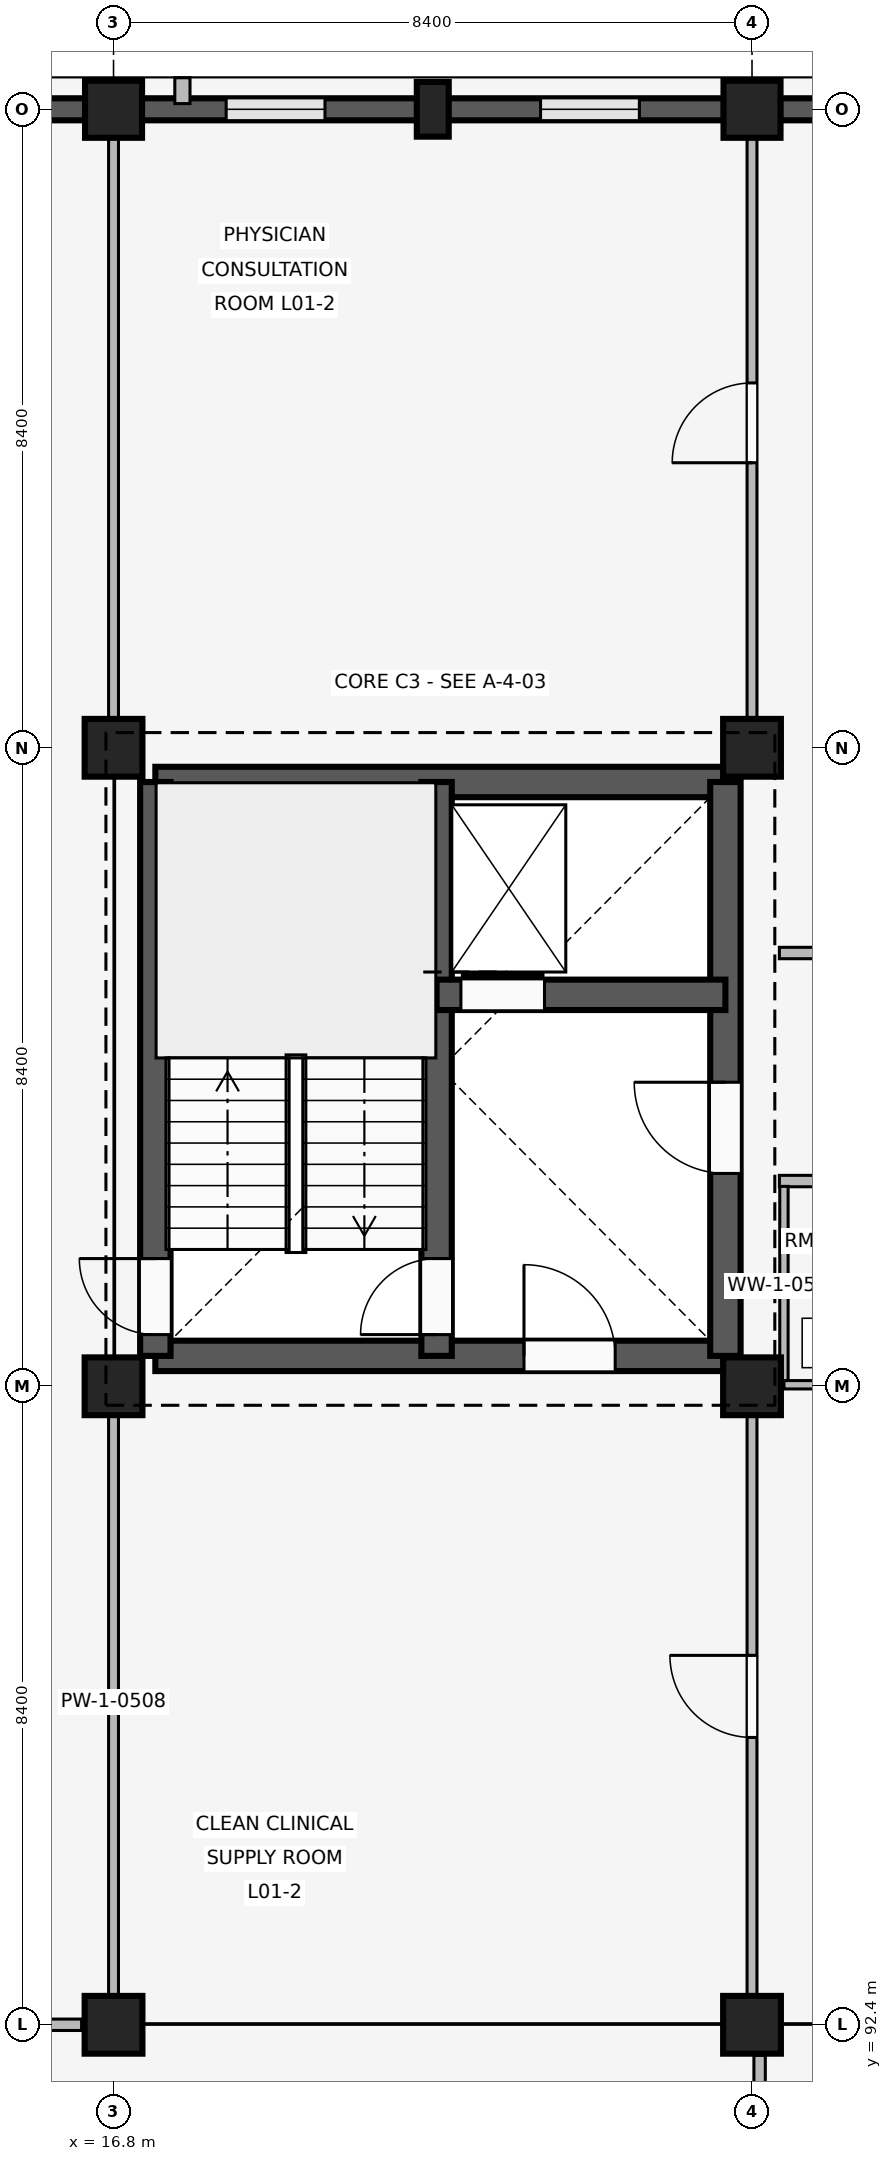
"""IFC4 building model, lengths in metres.
Left out: names, types, materials, properties, quantities, classifications, styles, units other than length and angle.
Written with IfcOpenShell. Run it as: python <this file> out.ifc"""

import sys

from ifc_helpers import new_model, si_unit, direction, frame, frame_2d, origin, origin_2d, place, context, subcontext, project, spatial, rectangle, extrude, element, fill, save


model = new_model("IFC4")
c1 = context("Model", 3, precision=1e-05, world=origin(), true_north=direction((0.0, 1.0)))
c2 = subcontext(c1, "Body", "Model", "MODEL_VIEW")
j1 = project(units=[si_unit("LENGTHUNIT", "METRE"), si_unit("PLANEANGLEUNIT", "RADIAN")], contexts=[c1])
p1 = place(None, origin())
s1 = spatial("IfcSite", under=j1, at=p1, CompositionType="ELEMENT")
p2 = place(p1, origin())
s2 = spatial("IfcBuilding", under=s1, at=p2, CompositionType="ELEMENT")
p3 = place(p2, frame((0.0, 0.0, 4.8)))
s3 = spatial("IfcBuildingStorey", under=s2, at=p3, CompositionType="ELEMENT", Elevation=4.8)
for number, where, z_axis, x_axis in (
    (1, (16.8, 92.4, 0.0), (0.0, 0.0, 1.0), (1.0, 0.0, 0.0)),
    (2, (16.8, 100.8, 0.0), (0.0, 0.0, 1.0), (1.0, 0.0, 0.0)),
    (3, (16.8, 109.2, 0.0), (0.0, 0.0, 1.0), (1.0, 0.0, 0.0)),
):
    element("IfcColumn", number, at=place(p3, frame(where, z_axis=z_axis, x_axis=x_axis)), inside=s3, PredefinedType="COLUMN", context=c2, shape_type="SweptSolid", body=[
        extrude(rectangle(XDim=0.76, YDim=0.76, at=origin_2d()), origin(), (0.0, 0.0, 1.0), 3.3),
    ])
p4 = place(p3, frame((16.8, 117.6, 0.0), z_axis=(0.0, 0.0, 1.0), x_axis=(1.0, 0.0, 0.0)))
e4 = element("IfcColumn", 4, at=p4, inside=s3, PredefinedType="COLUMN", context=c2, shape_type="SweptSolid", body=[
    extrude(rectangle(XDim=0.75, YDim=0.75, at=origin_2d()), origin(), (0.0, 0.0, 1.0), 3.3),
])
for number, where, z_axis, x_axis in (
    (5, (25.2, 92.4, 0.0), (0.0, 0.0, 1.0), (1.0, 0.0, 0.0)),
    (6, (25.2, 100.8, 0.0), (0.0, 0.0, 1.0), (1.0, 0.0, 0.0)),
    (7, (25.2, 109.2, 0.0), (0.0, 0.0, 1.0), (1.0, 0.0, 0.0)),
):
    element("IfcColumn", number, at=place(p3, frame(where, z_axis=z_axis, x_axis=x_axis)), inside=s3, PredefinedType="COLUMN", context=c2, shape_type="SweptSolid", body=[
        extrude(rectangle(XDim=0.76, YDim=0.76, at=origin_2d()), origin(), (0.0, 0.0, 1.0), 3.3),
    ])
p5 = place(p3, frame((25.2, 117.6, 0.0), z_axis=(0.0, 0.0, 1.0), x_axis=(1.0, 0.0, 0.0)))
e8 = element("IfcColumn", 8, at=p5, inside=s3, PredefinedType="COLUMN", context=c2, shape_type="SweptSolid", body=[
    extrude(rectangle(XDim=0.75, YDim=0.75, at=origin_2d()), origin(), (0.0, 0.0, 1.0), 3.3),
])
p6 = place(p3, frame((21.0, 117.6, 0.0), z_axis=(0.0, 0.0, 1.0), x_axis=(1.0, 0.0, 0.0)))
e9 = element("IfcColumn", 9, at=p6, inside=s3, PredefinedType="PILASTER", context=c2, shape_type="SweptSolid", body=[
    extrude(rectangle(XDim=0.42, YDim=0.72, at=origin_2d()), origin(), (0.0, 0.0, 1.0), 3.3),
])
p7 = place(p3, frame((8.77, 117.6, 0.0), z_axis=(0.0, 0.0, 1.0), x_axis=(1.0, 0.0, 0.0)))
e10 = element("IfcWall", 10, at=p7, inside=s3, PredefinedType="SOLIDWALL", context=c2, shape_type="SweptSolid", body=[
    extrude(rectangle(XDim=7.66, YDim=0.29, at=frame_2d((3.83, 0.0))), origin(), (0.0, 0.0, 1.0), 2.42),
])
p8 = place(p7, frame((1.088, 0.0, 1.05)))
e11 = element("IfcOpeningElement", 11, at=p8, cuts=e10, PredefinedType="OPENING", context=c2, shape_type="SweptSolid", body=[
    extrude(rectangle(XDim=1.5, YDim=0.75, at=frame_2d((0.75, 0.375))), frame((0.0, 0.155, 0.0), z_axis=(0.0, -1.0, 0.0), x_axis=(1.0, 0.0, 0.0)), (0.0, 0.0, 1.0), 0.31),
])
p9 = place(p7, frame((5.072, 0.0, 1.05)))
e12 = element("IfcOpeningElement", 12, at=p9, cuts=e10, PredefinedType="OPENING", context=c2, shape_type="SweptSolid", body=[
    extrude(rectangle(XDim=1.5, YDim=0.75, at=frame_2d((0.75, 0.375))), frame((0.0, 0.155, 0.0), z_axis=(0.0, -1.0, 0.0), x_axis=(1.0, 0.0, 0.0)), (0.0, 0.0, 1.0), 0.31),
])
p10 = place(p3, frame((17.17, 117.6, 0.0), z_axis=(0.0, 0.0, 1.0), x_axis=(1.0, 0.0, 0.0)))
e13 = element("IfcWall", 13, at=p10, inside=s3, PredefinedType="SOLIDWALL", context=c2, shape_type="SweptSolid", body=[
    extrude(rectangle(XDim=7.66, YDim=0.29, at=frame_2d((3.83, 0.0))), origin(), (0.0, 0.0, 1.0), 2.42),
])
p11 = place(p10, frame((1.112, 0.0, 1.05)))
e14 = element("IfcOpeningElement", 14, at=p11, cuts=e13, PredefinedType="OPENING", context=c2, shape_type="SweptSolid", body=[
    extrude(rectangle(XDim=1.3, YDim=0.75, at=frame_2d((0.65, 0.375))), frame((0.0, 0.155, 0.0), z_axis=(0.0, -1.0, 0.0), x_axis=(1.0, 0.0, 0.0)), (0.0, 0.0, 1.0), 0.31),
])
p12 = place(p10, frame((5.248, 0.0, 1.05)))
e15 = element("IfcOpeningElement", 15, at=p12, cuts=e13, PredefinedType="OPENING", context=c2, shape_type="SweptSolid", body=[
    extrude(rectangle(XDim=1.3, YDim=0.75, at=frame_2d((0.65, 0.375))), frame((0.0, 0.155, 0.0), z_axis=(0.0, -1.0, 0.0), x_axis=(1.0, 0.0, 0.0)), (0.0, 0.0, 1.0), 0.31),
])
p13 = place(p3, frame((17.706, 117.675, 0.0), z_axis=(0.0, 0.0, 1.0), x_axis=(0.0, 1.0, 0.0)))
e16 = element("IfcWall", 16, at=p13, inside=s3, PredefinedType="ELEMENTEDWALL", context=c2, shape_type="SweptSolid", body=[
    extrude(rectangle(XDim=0.34, YDim=0.2, at=frame_2d((0.17, 0.0))), origin(), (0.0, 0.0, 1.0), 2.4),
])
p14 = place(p3, frame((25.57, 117.6, 0.0), z_axis=(0.0, 0.0, 1.0), x_axis=(1.0, 0.0, 0.0)))
e17 = element("IfcWall", 17, at=p14, inside=s3, PredefinedType="SOLIDWALL", context=c2, shape_type="SweptSolid", body=[
    extrude(rectangle(XDim=7.66, YDim=0.29, at=frame_2d((3.83, 0.0))), origin(), (0.0, 0.0, 1.0), 2.42),
])
p15 = place(p14, frame((1.088, 0.0, 1.05)))
e18 = element("IfcOpeningElement", 18, at=p15, cuts=e17, PredefinedType="OPENING", context=c2, shape_type="SweptSolid", body=[
    extrude(rectangle(XDim=1.5, YDim=0.75, at=frame_2d((0.75, 0.375))), frame((0.0, 0.155, 0.0), z_axis=(0.0, -1.0, 0.0), x_axis=(1.0, 0.0, 0.0)), (0.0, 0.0, 1.0), 0.31),
])
p16 = place(p14, frame((5.072, 0.0, 1.05)))
e19 = element("IfcOpeningElement", 19, at=p16, cuts=e17, PredefinedType="OPENING", context=c2, shape_type="SweptSolid", body=[
    extrude(rectangle(XDim=1.5, YDim=0.75, at=frame_2d((0.75, 0.375))), frame((0.0, 0.155, 0.0), z_axis=(0.0, -1.0, 0.0), x_axis=(1.0, 0.0, 0.0)), (0.0, 0.0, 1.0), 0.31),
])
p17 = place(p3, frame((17.35, 101.2, 0.0), z_axis=(0.0, 0.0, 1.0), x_axis=(1.0, 0.0, 0.0)))
e20 = element("IfcWall", 20, at=p17, inside=s3, PredefinedType="SHEAR", context=c2, shape_type="SweptSolid", body=[
    extrude(rectangle(XDim=7.5, YDim=0.4, at=frame_2d((3.75, 0.0))), origin(), (0.0, 0.0, 1.0), 3.02),
])
p18 = place(p17, frame((4.85, 0.0, 0.0)))
e21 = element("IfcOpeningElement", 21, at=p18, cuts=e20, PredefinedType="OPENING", context=c2, shape_type="SweptSolid", body=[
    extrude(rectangle(XDim=1.2, YDim=2.1, at=frame_2d((0.6, 1.05))), frame((0.0, 0.21, 0.0), z_axis=(0.0, -1.0, 0.0), x_axis=(1.0, 0.0, 0.0)), (0.0, 0.0, 1.0), 0.42),
])
p19 = place(p3, frame((17.35, 108.75, 0.0), z_axis=(0.0, 0.0, 1.0), x_axis=(1.0, 0.0, 0.0)))
e22 = element("IfcWall", 22, at=p19, inside=s3, PredefinedType="SHEAR", context=c2, shape_type="SweptSolid", body=[
    extrude(rectangle(XDim=7.5, YDim=0.4, at=frame_2d((3.75, 0.0))), origin(), (0.0, 0.0, 1.0), 3.02),
])
p20 = place(p3, frame((17.35, 101.2, 0.0), z_axis=(0.0, 0.0, 1.0), x_axis=(0.0, 1.0, 0.0)))
e23 = element("IfcWall", 23, at=p20, inside=s3, PredefinedType="SHEAR", context=c2, shape_type="SweptSolid", body=[
    extrude(rectangle(XDim=7.55, YDim=0.4, at=frame_2d((3.775, 0.0))), origin(), (0.0, 0.0, 1.0), 3.02),
])
p21 = place(p20, frame((0.28, 0.0, 0.0)))
e24 = element("IfcOpeningElement", 24, at=p21, cuts=e23, PredefinedType="OPENING", context=c2, shape_type="SweptSolid", body=[
    extrude(rectangle(XDim=1.0, YDim=2.15, at=frame_2d((0.5, 1.075))), frame((0.0, 0.21, 0.0), z_axis=(0.0, -1.0, 0.0), x_axis=(1.0, 0.0, 0.0)), (0.0, 0.0, 1.0), 0.42),
])
p22 = place(p3, frame((24.85, 101.2, 0.0), z_axis=(0.0, 0.0, 1.0), x_axis=(0.0, 1.0, 0.0)))
e25 = element("IfcWall", 25, at=p22, inside=s3, PredefinedType="SHEAR", context=c2, shape_type="SweptSolid", body=[
    extrude(rectangle(XDim=7.55, YDim=0.4, at=frame_2d((3.775, 0.0))), origin(), (0.0, 0.0, 1.0), 3.02),
])
p23 = place(p22, frame((2.4, 0.0, 0.0)))
e26 = element("IfcOpeningElement", 26, at=p23, cuts=e25, PredefinedType="OPENING", context=c2, shape_type="SweptSolid", body=[
    extrude(rectangle(XDim=1.2, YDim=2.2, at=frame_2d((0.6, 1.1))), frame((0.0, 0.21, 0.0), z_axis=(0.0, -1.0, 0.0), x_axis=(1.0, 0.0, 0.0)), (0.0, 0.0, 1.0), 0.42),
])
p24 = place(p3, frame((21.05, 101.2, 0.0), z_axis=(0.0, 0.0, 1.0), x_axis=(0.0, 1.0, 0.0)))
e27 = element("IfcWall", 27, at=p24, inside=s3, PredefinedType="SHEAR", context=c2, shape_type="SweptSolid", body=[
    extrude(rectangle(XDim=7.55, YDim=0.4, at=frame_2d((3.775, 0.0))), origin(), (0.0, 0.0, 1.0), 3.02),
])
p25 = place(p24, frame((0.28, 0.0, 0.0)))
e28 = element("IfcOpeningElement", 28, at=p25, cuts=e27, PredefinedType="OPENING", context=c2, shape_type="SweptSolid", body=[
    extrude(rectangle(XDim=1.0, YDim=2.15, at=frame_2d((0.5, 1.075))), frame((0.0, 0.21, 0.0), z_axis=(0.0, -1.0, 0.0), x_axis=(1.0, 0.0, 0.0)), (0.0, 0.0, 1.0), 0.42),
])
p26 = place(p3, frame((21.05, 105.95, 0.0), z_axis=(0.0, 0.0, 1.0), x_axis=(1.0, 0.0, 0.0)))
e29 = element("IfcWall", 29, at=p26, inside=s3, PredefinedType="SHEAR", context=c2, shape_type="SweptSolid", body=[
    extrude(rectangle(XDim=3.8, YDim=0.4, at=frame_2d((1.9, 0.0))), origin(), (0.0, 0.0, 1.0), 3.02),
])
p27 = place(p26, frame((0.32, 0.0, 0.0)))
e30 = element("IfcOpeningElement", 30, at=p27, cuts=e29, PredefinedType="OPENING", context=c2, shape_type="SweptSolid", body=[
    extrude(rectangle(XDim=1.1, YDim=2.15, at=frame_2d((0.55, 1.075))), frame((0.0, 0.21, 0.0), z_axis=(0.0, -1.0, 0.0), x_axis=(1.0, 0.0, 0.0)), (0.0, 0.0, 1.0), 0.42),
])
p28 = place(p3, frame((16.8, 92.54, 0.0), z_axis=(0.0, 0.0, 1.0), x_axis=(0.0, 1.0, 0.0)))
e31 = element("IfcWall", 31, at=p28, inside=s3, PredefinedType="PARTITIONING", context=c2, shape_type="SweptSolid", body=[
    extrude(rectangle(XDim=8.21, YDim=0.13, at=frame_2d((4.105, 0.0))), origin(), (0.0, 0.0, 1.0), 2.4),
])
p29 = place(p3, frame((16.8, 109.55, 0.0), z_axis=(0.0, 0.0, 1.0), x_axis=(0.0, 1.0, 0.0)))
e32 = element("IfcWall", 32, at=p29, inside=s3, PredefinedType="PARTITIONING", context=c2, shape_type="SweptSolid", body=[
    extrude(rectangle(XDim=7.91, YDim=0.13, at=frame_2d((3.955, 0.0))), origin(), (0.0, 0.0, 1.0), 2.4),
])
p30 = place(p3, frame((25.2, 92.54, 0.0), z_axis=(0.0, 0.0, 1.0), x_axis=(0.0, 1.0, 0.0)))
e33 = element("IfcWall", 33, at=p30, inside=s3, PredefinedType="PARTITIONING", context=c2, shape_type="SweptSolid", body=[
    extrude(rectangle(XDim=8.21, YDim=0.13, at=frame_2d((4.105, 0.0))), origin(), (0.0, 0.0, 1.0), 2.4),
])
p31 = place(p30, frame((3.64, 0.0, 0.0)))
e34 = element("IfcOpeningElement", 34, at=p31, cuts=e33, PredefinedType="OPENING", context=c2, shape_type="SweptSolid", body=[
    extrude(rectangle(XDim=1.08, YDim=2.15, at=frame_2d((0.54, 1.075))), frame((0.0, 0.075, 0.0), z_axis=(0.0, -1.0, 0.0), x_axis=(1.0, 0.0, 0.0)), (0.0, 0.0, 1.0), 0.15),
])
p32 = place(p3, frame((25.2, 109.55, 0.0), z_axis=(0.0, 0.0, 1.0), x_axis=(0.0, 1.0, 0.0)))
e35 = element("IfcWall", 35, at=p32, inside=s3, PredefinedType="PARTITIONING", context=c2, shape_type="SweptSolid", body=[
    extrude(rectangle(XDim=7.91, YDim=0.13, at=frame_2d((3.955, 0.0))), origin(), (0.0, 0.0, 1.0), 2.4),
])
p33 = place(p32, frame((3.4, 0.0, 0.0)))
e36 = element("IfcOpeningElement", 36, at=p33, cuts=e35, PredefinedType="OPENING", context=c2, shape_type="SweptSolid", body=[
    extrude(rectangle(XDim=1.05, YDim=2.2, at=frame_2d((0.525, 1.1))), frame((0.0, 0.075, 0.0), z_axis=(0.0, -1.0, 0.0), x_axis=(1.0, 0.0, 0.0)), (0.0, 0.0, 1.0), 0.15),
])
p34 = place(p3, frame((25.56, 103.5, 0.0), z_axis=(0.0, 0.0, 1.0), x_axis=(1.0, 0.0, 0.0)))
e37 = element("IfcWall", 37, at=p34, inside=s3, PredefinedType="PARTITIONING", context=c2, shape_type="SweptSolid", body=[
    extrude(rectangle(XDim=7.96, YDim=0.15, at=frame_2d((3.98, 0.0))), origin(), (0.0, 0.0, 1.0), 2.4),
])
p35 = place(p34, frame((2.25, 0.0, 0.0)))
e38 = element("IfcOpeningElement", 38, at=p35, cuts=e37, PredefinedType="OPENING", context=c2, shape_type="SweptSolid", body=[
    extrude(rectangle(XDim=1.0, YDim=2.15, at=frame_2d((0.5, 1.075))), frame((0.0, 0.085, 0.0), z_axis=(0.0, -1.0, 0.0), x_axis=(1.0, 0.0, 0.0)), (0.0, 0.0, 1.0), 0.17),
])
p36 = place(p34, frame((5.95, 0.0, 0.0)))
e39 = element("IfcOpeningElement", 39, at=p36, cuts=e37, PredefinedType="OPENING", context=c2, shape_type="SweptSolid", body=[
    extrude(rectangle(XDim=1.0, YDim=2.15, at=frame_2d((0.5, 1.075))), frame((0.0, 0.085, 0.0), z_axis=(0.0, -1.0, 0.0), x_axis=(1.0, 0.0, 0.0)), (0.0, 0.0, 1.0), 0.17),
])
p37 = place(p3, frame((25.62, 100.82, 0.0), z_axis=(0.0, 0.0, 1.0), x_axis=(0.0, 1.0, 0.0)))
e40 = element("IfcWall", 40, at=p37, inside=s3, PredefinedType="PARTITIONING", context=c2, shape_type="SweptSolid", body=[
    extrude(rectangle(XDim=2.61, YDim=0.11, at=frame_2d((1.305, 0.0))), origin(), (0.0, 0.0, 1.0), 2.4),
])
p38 = place(p3, frame((25.62, 100.82, 0.0), z_axis=(0.0, 0.0, 1.0), x_axis=(1.0, 0.0, 0.0)))
e41 = element("IfcWall", 41, at=p38, inside=s3, PredefinedType="PARTITIONING", context=c2, shape_type="SweptSolid", body=[
    extrude(rectangle(XDim=1.98, YDim=0.11, at=frame_2d((0.99, 0.0))), origin(), (0.0, 0.0, 1.0), 2.4),
])
p39 = place(p38, frame((0.54, 0.0, 0.0)))
e42 = element("IfcOpeningElement", 42, at=p39, cuts=e41, PredefinedType="OPENING", context=c2, shape_type="SweptSolid", body=[
    extrude(rectangle(XDim=0.9, YDim=2.1, at=frame_2d((0.45, 1.05))), frame((0.0, 0.065, 0.0), z_axis=(0.0, -1.0, 0.0), x_axis=(1.0, 0.0, 0.0)), (0.0, 0.0, 1.0), 0.13),
])
p40 = place(p3, frame((33.52, 106.5, 0.0), z_axis=(0.0, 0.0, 1.0), x_axis=(-1.0, 0.0, 0.0)))
e43 = element("IfcWall", 43, at=p40, inside=s3, PredefinedType="PARTITIONING", context=c2, shape_type="SweptSolid", body=[
    extrude(rectangle(XDim=7.96, YDim=0.15, at=frame_2d((3.98, 0.0))), origin(), (0.0, 0.0, 1.0), 2.4),
])
p41 = place(p40, frame((3.43, 0.0, 0.0)))
e44 = element("IfcOpeningElement", 44, at=p41, cuts=e43, PredefinedType="OPENING", context=c2, shape_type="SweptSolid", body=[
    extrude(rectangle(XDim=1.1, YDim=2.2, at=frame_2d((0.55, 1.1))), frame((0.0, 0.085, 0.0), z_axis=(0.0, -1.0, 0.0), x_axis=(1.0, 0.0, 0.0)), (0.0, 0.0, 1.0), 0.17),
])
p42 = place(p3, frame((25.3, 76.0, 0.0), z_axis=(0.0, 0.0, 1.0), x_axis=(0.0, 1.0, 0.0)))
e45 = element("IfcWall", 45, at=p42, inside=s3, PredefinedType="PARTITIONING", context=c2, shape_type="SweptSolid", body=[
    extrude(rectangle(XDim=16.0, YDim=0.15, at=frame_2d((8.0, 0.0))), origin(), (0.0, 0.0, 1.0), 2.4),
])
p43 = place(p42, frame((3.4, 0.0, 0.0)))
e46 = element("IfcOpeningElement", 46, at=p43, cuts=e45, PredefinedType="OPENING", context=c2, shape_type="SweptSolid", body=[
    extrude(rectangle(XDim=1.4, YDim=2.25, at=frame_2d((0.7, 1.125))), frame((0.0, 0.085, 0.0), z_axis=(0.0, -1.0, 0.0), x_axis=(1.0, 0.0, 0.0)), (0.0, 0.0, 1.0), 0.17),
])
p44 = place(p3, frame((0.42, 92.4, 0.0), z_axis=(0.0, 0.0, 1.0), x_axis=(1.0, 0.0, 0.0)))
e47 = element("IfcWall", 47, at=p44, inside=s3, PredefinedType="PARTITIONING", context=c2, shape_type="SweptSolid", body=[
    extrude(rectangle(XDim=15.96, YDim=0.15, at=frame_2d((7.98, 0.0))), origin(), (0.0, 0.0, 1.0), 2.4),
])
p45 = place(p44, frame((3.4, 0.0, 0.0)))
e48 = element("IfcOpeningElement", 48, at=p45, cuts=e47, PredefinedType="OPENING", context=c2, shape_type="SweptSolid", body=[
    extrude(rectangle(XDim=1.4, YDim=2.25, at=frame_2d((0.7, 1.125))), frame((0.0, 0.085, 0.0), z_axis=(0.0, -1.0, 0.0), x_axis=(1.0, 0.0, 0.0)), (0.0, 0.0, 1.0), 0.17),
])
p46 = place(p11, origin())
e49 = element("IfcWindow", 49, at=p46, inside=s3, PartitioningType="SINGLE_PANEL", PredefinedType="WINDOW", context=c2, shape_type="SweptSolid", body=[
    extrude(rectangle(XDim=1.3, YDim=0.75, at=frame_2d((0.65, 0.375))), frame((0.0, 0.03, 0.0), z_axis=(0.0, -1.0, 0.0), x_axis=(1.0, 0.0, 0.0)), (0.0, 0.0, 1.0), 0.06),
])
fill(e14, e49)
p47 = place(p12, origin())
e50 = element("IfcWindow", 50, at=p47, inside=s3, PartitioningType="SINGLE_PANEL", PredefinedType="WINDOW", context=c2, shape_type="SweptSolid", body=[
    extrude(rectangle(XDim=1.3, YDim=0.75, at=frame_2d((0.65, 0.375))), frame((0.0, 0.03, 0.0), z_axis=(0.0, -1.0, 0.0), x_axis=(1.0, 0.0, 0.0)), (0.0, 0.0, 1.0), 0.06),
])
fill(e15, e50)
p48 = place(p23, origin())
e51 = element("IfcDoor", 51, at=p48, inside=s3, OperationType="SINGLE_SWING_RIGHT", PredefinedType="DOOR", context=c2, shape_type="SweptSolid", body=[
    extrude(rectangle(XDim=1.2, YDim=2.2, at=frame_2d((0.6, 1.1))), frame((0.0, 0.025, 0.0), z_axis=(0.0, -1.0, 0.0), x_axis=(1.0, 0.0, 0.0)), (0.0, 0.0, 1.0), 0.05),
])
fill(e26, e51)
p49 = place(p18, origin())
e52 = element("IfcDoor", 52, at=p49, inside=s3, OperationType="SINGLE_SWING_LEFT", PredefinedType="DOOR", context=c2, shape_type="SweptSolid", body=[
    extrude(rectangle(XDim=1.2, YDim=2.1, at=frame_2d((0.6, 1.05))), frame((0.0, 0.025, 0.0), z_axis=(0.0, -1.0, 0.0), x_axis=(1.0, 0.0, 0.0)), (0.0, 0.0, 1.0), 0.05),
])
fill(e21, e52)
p50 = place(p21, origin())
e53 = element("IfcDoor", 53, at=p50, inside=s3, OperationType="SINGLE_SWING_RIGHT", PredefinedType="DOOR", context=c2, shape_type="SweptSolid", body=[
    extrude(rectangle(XDim=1.0, YDim=2.15, at=frame_2d((0.5, 1.075))), frame((0.0, 0.025, 0.0), z_axis=(0.0, -1.0, 0.0), x_axis=(1.0, 0.0, 0.0)), (0.0, 0.0, 1.0), 0.05),
])
fill(e24, e53)
p51 = place(p25, origin())
e54 = element("IfcDoor", 54, at=p51, inside=s3, OperationType="SINGLE_SWING_LEFT", PredefinedType="DOOR", context=c2, shape_type="SweptSolid", body=[
    extrude(rectangle(XDim=1.0, YDim=2.15, at=frame_2d((0.5, 1.075))), frame((0.0, 0.025, 0.0), z_axis=(0.0, -1.0, 0.0), x_axis=(1.0, 0.0, 0.0)), (0.0, 0.0, 1.0), 0.05),
])
fill(e28, e54)
p52 = place(p27, origin())
e55 = element("IfcDoor", 55, at=p52, inside=s3, OperationType="SLIDING_TO_LEFT", PredefinedType="DOOR", context=c2, shape_type="SweptSolid", body=[
    extrude(rectangle(XDim=1.1, YDim=2.15, at=frame_2d((0.55, 1.075))), frame((0.0, 0.025, 0.0), z_axis=(0.0, -1.0, 0.0), x_axis=(1.0, 0.0, 0.0)), (0.0, 0.0, 1.0), 0.05),
])
fill(e30, e55)
p53 = place(p31, origin())
e56 = element("IfcDoor", 56, at=p53, inside=s3, OperationType="SINGLE_SWING_RIGHT", PredefinedType="DOOR", context=c2, shape_type="SweptSolid", body=[
    extrude(rectangle(XDim=1.08, YDim=2.15, at=frame_2d((0.54, 1.075))), frame((0.0, 0.025, 0.0), z_axis=(0.0, -1.0, 0.0), x_axis=(1.0, 0.0, 0.0)), (0.0, 0.0, 1.0), 0.05),
])
fill(e34, e56)
p54 = place(p33, origin())
e57 = element("IfcDoor", 57, at=p54, inside=s3, OperationType="SINGLE_SWING_LEFT", PredefinedType="DOOR", context=c2, shape_type="SweptSolid", body=[
    extrude(rectangle(XDim=1.05, YDim=2.2, at=frame_2d((0.525, 1.1))), frame((0.0, 0.025, 0.0), z_axis=(0.0, -1.0, 0.0), x_axis=(1.0, 0.0, 0.0)), (0.0, 0.0, 1.0), 0.05),
])
fill(e36, e57)
save(model, sys.argv[1])
